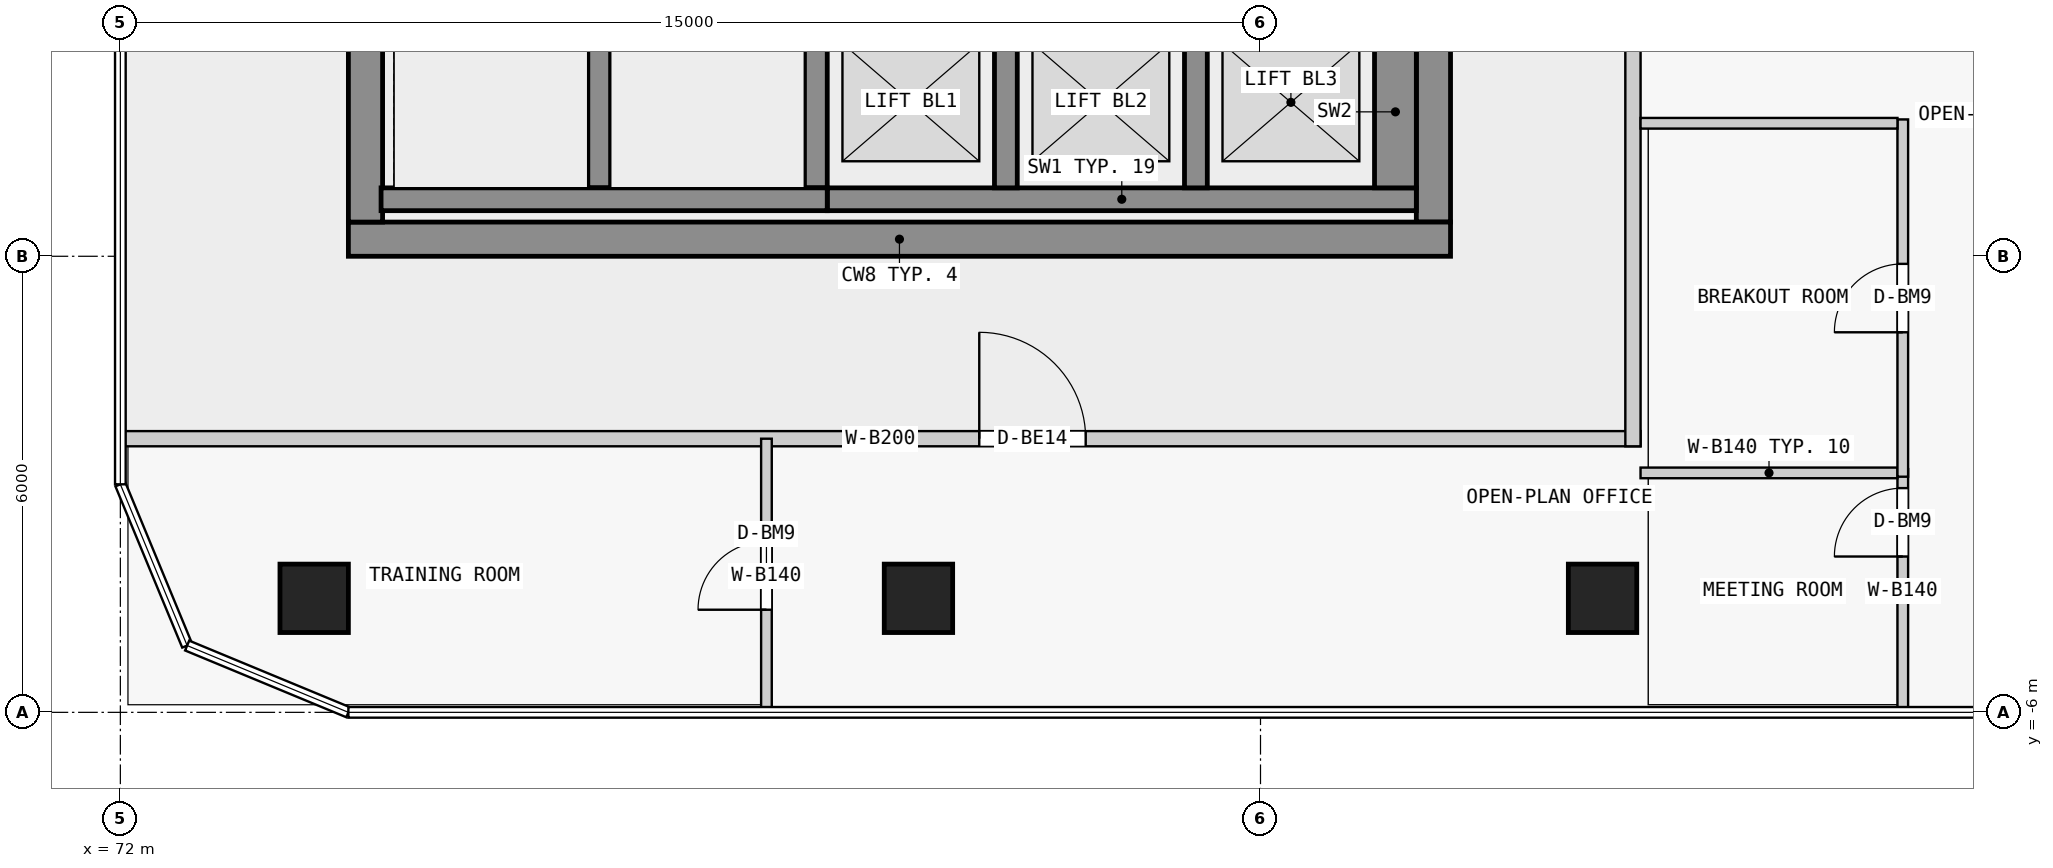
"""IFC4 building model, lengths in metres.
Left out: names, types, materials, properties, quantities, classifications, styles, units other than length and angle.
Written with IfcOpenShell. Run it as: python <this file> out.ifc"""

import sys

from ifc_helpers import new_model, si_unit, direction, frame, frame_2d, origin, origin_2d, place, context, subcontext, project, spatial, rectangle, extrude, element, fill, save


model = new_model("IFC4")
c1 = context("Model", 3, precision=1e-05, world=origin(), true_north=direction((0.0, 1.0)))
c2 = subcontext(c1, "Body", "Model", "MODEL_VIEW")
j1 = project(units=[si_unit("LENGTHUNIT", "METRE"), si_unit("PLANEANGLEUNIT", "RADIAN")], contexts=[c1])
p1 = place(None, origin())
s1 = spatial("IfcSite", under=j1, at=p1, CompositionType="ELEMENT")
p2 = place(p1, origin())
s2 = spatial("IfcBuilding", under=s1, at=p2, CompositionType="ELEMENT")
p3 = place(p2, frame((0.0, 0.0, 68.8)))
s3 = spatial("IfcBuildingStorey", under=s2, at=p3, CompositionType="ELEMENT", Elevation=68.8)
for number, where, z_axis, x_axis in (
    (1, (74.55, -4.5, 0.0), (0.0, 0.0, 1.0), (1.0, 0.0, 0.0)),
    (2, (82.5, -4.5, 0.0), (0.0, 0.0, 1.0), (1.0, 0.0, 0.0)),
    (3, (91.5, -4.5, 0.0), (0.0, 0.0, 1.0), (1.0, 0.0, 0.0)),
):
    element("IfcColumn", number, at=place(p3, frame(where, z_axis=z_axis, x_axis=x_axis)), inside=s3, PredefinedType="COLUMN", context=c2, shape_type="SweptSolid", body=[
        extrude(rectangle(XDim=0.9, YDim=0.9, at=origin_2d()), origin(), (0.0, 0.0, 1.0), 3.5),
    ])
p4 = place(p3, frame((75.0, 0.225, 0.0), z_axis=(0.0, 0.0, 1.0), x_axis=(1.0, 0.0, 0.0)))
e4 = element("IfcWall", 4, at=p4, inside=s3, PredefinedType="SHEAR", context=c2, shape_type="SweptSolid", body=[
    extrude(rectangle(XDim=14.5, YDim=0.45, at=frame_2d((7.25, 0.0))), origin(), (0.0, 0.0, 1.0), 3.2),
])
p5 = place(p3, frame((75.225, 0.45, 0.0), z_axis=(0.0, 0.0, 1.0), x_axis=(0.0, 1.0, 0.0)))
e5 = element("IfcWall", 5, at=p5, inside=s3, PredefinedType="SHEAR", context=c2, shape_type="SweptSolid", body=[
    extrude(rectangle(XDim=17.1, YDim=0.45, at=frame_2d((8.55, 0.0))), origin(), (0.0, 0.0, 1.0), 3.2),
])
p6 = place(p5, frame((7.875, 0.0, 0.0)))
e6 = element("IfcOpeningElement", 6, at=p6, cuts=e5, PredefinedType="OPENING", context=c2, shape_type="SweptSolid", body=[
    extrude(rectangle(XDim=1.8, YDim=2.1, at=frame_2d((0.9, 1.05))), frame((0.0, 0.235, 0.0), z_axis=(0.0, -1.0, 0.0), x_axis=(1.0, 0.0, 0.0)), (0.0, 0.0, 1.0), 0.47),
])
p7 = place(p3, frame((89.275, 0.45, 0.0), z_axis=(0.0, 0.0, 1.0), x_axis=(0.0, 1.0, 0.0)))
e7 = element("IfcWall", 7, at=p7, inside=s3, PredefinedType="SHEAR", context=c2, shape_type="SweptSolid", body=[
    extrude(rectangle(XDim=17.1, YDim=0.45, at=frame_2d((8.55, 0.0))), origin(), (0.0, 0.0, 1.0), 3.2),
])
p8 = place(p7, frame((7.65, 0.0, 0.0)))
e8 = element("IfcOpeningElement", 8, at=p8, cuts=e7, PredefinedType="OPENING", context=c2, shape_type="SweptSolid", body=[
    extrude(rectangle(XDim=1.8, YDim=2.1, at=frame_2d((0.9, 1.05))), frame((0.0, 0.235, 0.0), z_axis=(0.0, -1.0, 0.0), x_axis=(1.0, 0.0, 0.0)), (0.0, 0.0, 1.0), 0.47),
])
p9 = place(p7, frame((15.65, 0.0, 0.0)))
e9 = element("IfcOpeningElement", 9, at=p9, cuts=e7, PredefinedType="OPENING", context=c2, shape_type="SweptSolid", body=[
    extrude(rectangle(XDim=0.9, YDim=2.1, at=frame_2d((0.45, 1.05))), frame((0.0, 0.235, 0.0), z_axis=(0.0, -1.0, 0.0), x_axis=(1.0, 0.0, 0.0)), (0.0, 0.0, 1.0), 0.47),
])
p10 = place(p3, frame((75.43, 0.75, 0.0), z_axis=(0.0, 0.0, 1.0), x_axis=(1.0, 0.0, 0.0)))
e10 = element("IfcWall", 10, at=p10, inside=s3, PredefinedType="SHEAR", context=c2, shape_type="SweptSolid", body=[
    extrude(rectangle(XDim=5.87, YDim=0.3, at=frame_2d((2.935, 0.0))), origin(), (0.0, 0.0, 1.0), 3.2),
])
for number, where, z_axis, x_axis in (
    (11, (78.3, 0.9, 0.0), (0.0, 0.0, 1.0), (0.0, 1.0, 0.0)),
    (12, (81.15, 0.9, 0.0), (0.0, 0.0, 1.0), (0.0, 1.0, 0.0)),
):
    element("IfcWall", number, at=place(p3, frame(where, z_axis=z_axis, x_axis=x_axis)), inside=s3, PredefinedType="SHEAR", context=c2, shape_type="SweptSolid", body=[
        extrude(rectangle(XDim=6.4, YDim=0.3, at=frame_2d((3.2, 0.0))), origin(), (0.0, 0.0, 1.0), 3.2),
    ])
p11 = place(p3, frame((81.3, 0.75, 0.0), z_axis=(0.0, 0.0, 1.0), x_axis=(1.0, 0.0, 0.0)))
e13 = element("IfcWall", 13, at=p11, inside=s3, PredefinedType="SHEAR", context=c2, shape_type="SweptSolid", body=[
    extrude(rectangle(XDim=7.75, YDim=0.3, at=frame_2d((3.875, 0.0))), origin(), (0.0, 0.0, 1.0), 3.2),
])
for number, where, z_axis, x_axis in (
    (14, (83.65, 0.9, 0.0), (0.0, 0.0, 1.0), (0.0, 1.0, 0.0)),
    (15, (86.15, 0.9, 0.0), (0.0, 0.0, 1.0), (0.0, 1.0, 0.0)),
):
    element("IfcWall", number, at=place(p3, frame(where, z_axis=z_axis, x_axis=x_axis)), inside=s3, PredefinedType="SHEAR", context=c2, shape_type="SweptSolid", body=[
        extrude(rectangle(XDim=2.0, YDim=0.3, at=frame_2d((1.0, 0.0))), origin(), (0.0, 0.0, 1.0), 3.2),
    ])
p12 = place(p3, frame((88.775, 0.9, 0.0), z_axis=(0.0, 0.0, 1.0), x_axis=(0.0, 1.0, 0.0)))
e16 = element("IfcWall", 16, at=p12, inside=s3, PredefinedType="SHEAR", context=c2, shape_type="SweptSolid", body=[
    extrude(rectangle(XDim=2.0, YDim=0.55, at=frame_2d((1.0, 0.0))), origin(), (0.0, 0.0, 1.0), 3.2),
])
p13 = place(p3, frame((72.0, -2.4, 0.0), z_axis=(0.0, 0.0, 1.0), x_axis=(1.0, 0.0, 0.0)))
e17 = element("IfcWall", 17, at=p13, inside=s3, PredefinedType="PARTITIONING", context=c2, shape_type="SweptSolid", body=[
    extrude(rectangle(XDim=20.0, YDim=0.2, at=frame_2d((10.0, 0.0))), origin(), (0.0, 0.0, 1.0), 3.2),
])
p14 = place(p13, frame((11.3, 0.0, 0.0)))
e18 = element("IfcOpeningElement", 18, at=p14, cuts=e17, PredefinedType="OPENING", context=c2, shape_type="SweptSolid", body=[
    extrude(rectangle(XDim=1.4, YDim=2.4, at=frame_2d((0.7, 1.2))), frame((0.0, 0.11, 0.0), z_axis=(0.0, -1.0, 0.0), x_axis=(1.0, 0.0, 0.0)), (0.0, 0.0, 1.0), 0.22),
])
p15 = place(p3, frame((91.9, -2.5, 0.0), z_axis=(0.0, 0.0, 1.0), x_axis=(0.0, 1.0, 0.0)))
e19 = element("IfcWall", 19, at=p15, inside=s3, PredefinedType="PARTITIONING", context=c2, shape_type="SweptSolid", body=[
    extrude(rectangle(XDim=12.1, YDim=0.2, at=frame_2d((6.05, 0.0))), origin(), (0.0, 0.0, 1.0), 3.2),
])
p16 = place(p3, frame((80.5, -6.0, 0.0), z_axis=(0.0, 0.0, 1.0), x_axis=(0.0, 1.0, 0.0)))
e20 = element("IfcWall", 20, at=p16, inside=s3, PredefinedType="PARTITIONING", context=c2, shape_type="SweptSolid", body=[
    extrude(rectangle(XDim=3.6, YDim=0.14, at=frame_2d((1.8, 0.0))), origin(), (0.0, 0.0, 1.0), 3.2),
])
p17 = place(p16, frame((1.35, 0.0, 0.0)))
e21 = element("IfcOpeningElement", 21, at=p17, cuts=e20, PredefinedType="OPENING", context=c2, shape_type="SweptSolid", body=[
    extrude(rectangle(XDim=0.9, YDim=2.4, at=frame_2d((0.45, 1.2))), frame((0.0, 0.08, 0.0), z_axis=(0.0, -1.0, 0.0), x_axis=(1.0, 0.0, 0.0)), (0.0, 0.0, 1.0), 0.16),
])
p18 = place(p3, frame((95.45, -6.0, 0.0), z_axis=(0.0, 0.0, 1.0), x_axis=(0.0, 1.0, 0.0)))
e22 = element("IfcWall", 22, at=p18, inside=s3, PredefinedType="PARTITIONING", context=c2, shape_type="SweptSolid", body=[
    extrude(rectangle(XDim=3.2, YDim=0.14, at=frame_2d((1.6, 0.0))), origin(), (0.0, 0.0, 1.0), 3.2),
])
p19 = place(p18, frame((2.05, 0.0, 0.0)))
e23 = element("IfcOpeningElement", 23, at=p19, cuts=e22, PredefinedType="OPENING", context=c2, shape_type="SweptSolid", body=[
    extrude(rectangle(XDim=0.9, YDim=2.4, at=frame_2d((0.45, 1.2))), frame((0.0, 0.08, 0.0), z_axis=(0.0, -1.0, 0.0), x_axis=(1.0, 0.0, 0.0)), (0.0, 0.0, 1.0), 0.16),
])
p20 = place(p3, frame((92.0, -2.85, 0.0), z_axis=(0.0, 0.0, 1.0), x_axis=(1.0, 0.0, 0.0)))
e24 = element("IfcWall", 24, at=p20, inside=s3, PredefinedType="PARTITIONING", context=c2, shape_type="SweptSolid", body=[
    extrude(rectangle(XDim=3.38, YDim=0.14, at=frame_2d((1.69, 0.0))), origin(), (0.0, 0.0, 1.0), 3.2),
])
p21 = place(p3, frame((95.45, -2.9, 0.0), z_axis=(0.0, 0.0, 1.0), x_axis=(0.0, 1.0, 0.0)))
e25 = element("IfcWall", 25, at=p21, inside=s3, PredefinedType="PARTITIONING", context=c2, shape_type="SweptSolid", body=[
    extrude(rectangle(XDim=4.7, YDim=0.14, at=frame_2d((2.35, 0.0))), origin(), (0.0, 0.0, 1.0), 3.2),
])
p22 = place(p21, frame((1.9, 0.0, 0.0)))
e26 = element("IfcOpeningElement", 26, at=p22, cuts=e25, PredefinedType="OPENING", context=c2, shape_type="SweptSolid", body=[
    extrude(rectangle(XDim=0.9, YDim=2.4, at=frame_2d((0.45, 1.2))), frame((0.0, 0.08, 0.0), z_axis=(0.0, -1.0, 0.0), x_axis=(1.0, 0.0, 0.0)), (0.0, 0.0, 1.0), 0.16),
])
p23 = place(p3, frame((92.0, 1.75, 0.0), z_axis=(0.0, 0.0, 1.0), x_axis=(1.0, 0.0, 0.0)))
e27 = element("IfcWall", 27, at=p23, inside=s3, PredefinedType="PARTITIONING", context=c2, shape_type="SweptSolid", body=[
    extrude(rectangle(XDim=3.38, YDim=0.14, at=frame_2d((1.69, 0.0))), origin(), (0.0, 0.0, 1.0), 3.2),
])
p24 = place(p14, origin())
e28 = element("IfcDoor", 28, at=p24, inside=s3, OperationType="DOUBLE_DOOR_SINGLE_SWING", PredefinedType="DOOR", context=c2, shape_type="SweptSolid", body=[
    extrude(rectangle(XDim=1.4, YDim=2.4, at=frame_2d((0.7, 1.2))), frame((0.0, 0.025, 0.0), z_axis=(0.0, -1.0, 0.0), x_axis=(1.0, 0.0, 0.0)), (0.0, 0.0, 1.0), 0.05),
])
fill(e18, e28)
p25 = place(p17, origin())
e29 = element("IfcDoor", 29, at=p25, inside=s3, OperationType="SINGLE_SWING_LEFT", PredefinedType="DOOR", context=c2, shape_type="SweptSolid", body=[
    extrude(rectangle(XDim=0.9, YDim=2.4, at=frame_2d((0.45, 1.2))), frame((0.0, 0.025, 0.0), z_axis=(0.0, -1.0, 0.0), x_axis=(1.0, 0.0, 0.0)), (0.0, 0.0, 1.0), 0.05),
])
fill(e21, e29)
p26 = place(p19, origin())
e30 = element("IfcDoor", 30, at=p26, inside=s3, OperationType="SINGLE_SWING_LEFT", PredefinedType="DOOR", context=c2, shape_type="SweptSolid", body=[
    extrude(rectangle(XDim=0.9, YDim=2.4, at=frame_2d((0.45, 1.2))), frame((0.0, 0.025, 0.0), z_axis=(0.0, -1.0, 0.0), x_axis=(1.0, 0.0, 0.0)), (0.0, 0.0, 1.0), 0.05),
])
fill(e23, e30)
p27 = place(p22, origin())
e31 = element("IfcDoor", 31, at=p27, inside=s3, OperationType="SINGLE_SWING_LEFT", PredefinedType="DOOR", context=c2, shape_type="SweptSolid", body=[
    extrude(rectangle(XDim=0.9, YDim=2.4, at=frame_2d((0.45, 1.2))), frame((0.0, 0.025, 0.0), z_axis=(0.0, -1.0, 0.0), x_axis=(1.0, 0.0, 0.0)), (0.0, 0.0, 1.0), 0.05),
])
fill(e26, e31)
save(model, sys.argv[1])
